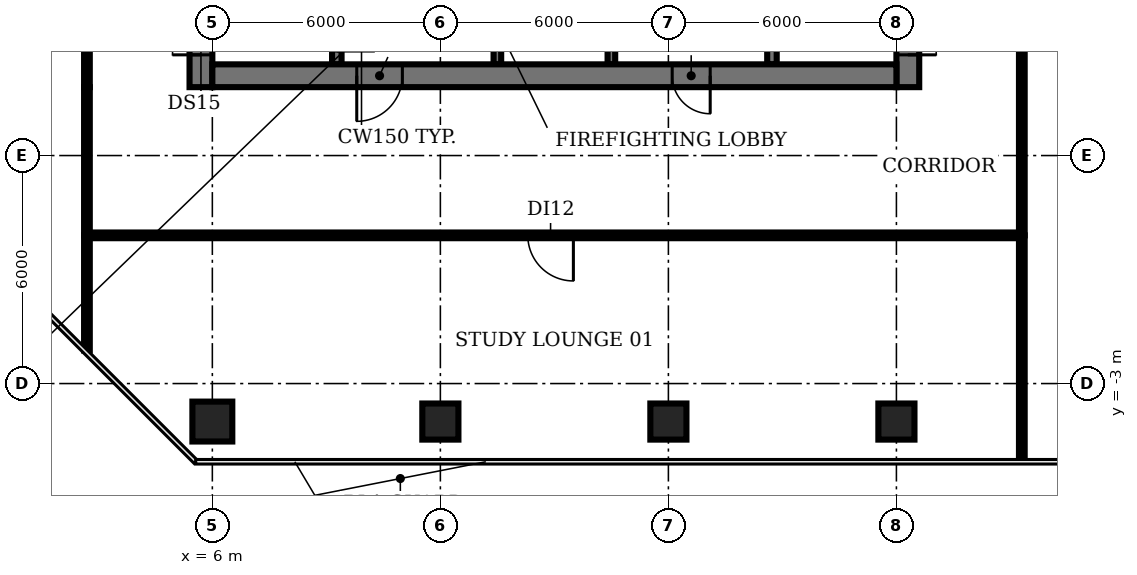
"""IFC4 building model, lengths in metres.
Left out: names, types, materials, properties, quantities, classifications, styles, units other than length and angle.
Written with IfcOpenShell. Run it as: python <this file> out.ifc"""

import sys

from ifc_helpers import new_model, si_unit, direction, frame, frame_2d, origin, origin_2d, place, context, subcontext, project, spatial, rectangle, circle, extrude, element, fill, save


model = new_model("IFC4")
c1 = context("Model", 3, precision=1e-05, world=origin(), true_north=direction((0.0, 1.0)))
c2 = subcontext(c1, "Body", "Model", "MODEL_VIEW")
j1 = project(units=[si_unit("LENGTHUNIT", "METRE"), si_unit("PLANEANGLEUNIT", "RADIAN")], contexts=[c1])
p1 = place(None, origin())
s1 = spatial("IfcSite", under=j1, at=p1, CompositionType="ELEMENT")
p2 = place(p1, origin())
s2 = spatial("IfcBuilding", under=s1, at=p2, CompositionType="ELEMENT")
p3 = place(p2, frame((0.0, 0.0, 192.8)))
s3 = spatial("IfcBuildingStorey", under=s2, at=p3, CompositionType="ELEMENT", Elevation=192.8)
p4 = place(p3, frame((6.0, -4.0, 0.0), z_axis=(0.0, 0.0, 1.0), x_axis=(1.0, 0.0, 0.0)))
e1 = element("IfcColumn", 1, at=p4, inside=s3, PredefinedType="COLUMN", context=c2, shape_type="SweptSolid", body=[
    extrude(circle(Radius=0.525, at=origin_2d()), origin(), (0.0, 0.0, 1.0), 3.2),
])
for number, where, z_axis, x_axis in (
    (2, (12.0, -4.0, 0.0), (0.0, 0.0, 1.0), (1.0, 0.0, 0.0)),
    (3, (18.0, -4.0, 0.0), (0.0, 0.0, 1.0), (1.0, 0.0, 0.0)),
    (4, (24.0, -4.0, 0.0), (0.0, 0.0, 1.0), (1.0, 0.0, 0.0)),
):
    element("IfcColumn", number, at=place(p3, frame(where, z_axis=z_axis, x_axis=x_axis)), inside=s3, PredefinedType="COLUMN", context=c2, shape_type="SweptSolid", body=[
        extrude(rectangle(XDim=0.95, YDim=0.95, at=origin_2d()), origin(), (0.0, 0.0, 1.0), 3.2),
    ])
p5 = place(p3, frame((9.275, 11.825, 0.0), z_axis=(0.0, 0.0, 1.0), x_axis=(0.0, -1.0, 0.0)))
e5 = element("IfcWall", 5, at=p5, inside=s3, PredefinedType="SHEAR", context=c2, shape_type="SweptSolid", body=[
    extrude(rectangle(XDim=6.425, YDim=0.25, at=frame_2d((3.212, 0.0))), origin(), (0.0, 0.0, 1.0), 3.8),
])
p6 = place(p5, frame((5.075, 0.0, 0.0)))
e6 = element("IfcOpeningElement", 6, at=p6, cuts=e5, PredefinedType="OPENING", context=c2, shape_type="SweptSolid", body=[
    extrude(rectangle(XDim=1.0, YDim=2.1, at=frame_2d((0.5, 1.05))), frame((0.0, 0.135, 0.0), z_axis=(0.0, -1.0, 0.0), x_axis=(1.0, 0.0, 0.0)), (0.0, 0.0, 1.0), 0.27),
])
p7 = place(p3, frame((13.5, 5.4, 0.0), z_axis=(0.0, 0.0, 1.0), x_axis=(0.0, 1.0, 0.0)))
e7 = element("IfcWall", 7, at=p7, inside=s3, PredefinedType="SHEAR", context=c2, shape_type="SweptSolid", body=[
    extrude(rectangle(XDim=8.2, YDim=0.2, at=frame_2d((4.1, 0.0))), origin(), (0.0, 0.0, 1.0), 3.8),
])
p8 = place(p7, frame((0.75, 0.0, 0.0)))
e8 = element("IfcOpeningElement", 8, at=p8, cuts=e7, PredefinedType="OPENING", context=c2, shape_type="SweptSolid", body=[
    extrude(rectangle(XDim=1.1, YDim=2.1, at=frame_2d((0.55, 1.05))), frame((0.0, 0.11, 0.0), z_axis=(0.0, -1.0, 0.0), x_axis=(1.0, 0.0, 0.0)), (0.0, 0.0, 1.0), 0.22),
])
p9 = place(p7, frame((3.55, 0.0, 0.0)))
e9 = element("IfcOpeningElement", 9, at=p9, cuts=e7, PredefinedType="OPENING", context=c2, shape_type="SweptSolid", body=[
    extrude(rectangle(XDim=1.1, YDim=2.1, at=frame_2d((0.55, 1.05))), frame((0.0, 0.11, 0.0), z_axis=(0.0, -1.0, 0.0), x_axis=(1.0, 0.0, 0.0)), (0.0, 0.0, 1.0), 0.22),
])
p10 = place(p7, frame((6.35, 0.0, 0.0)))
e10 = element("IfcOpeningElement", 10, at=p10, cuts=e7, PredefinedType="OPENING", context=c2, shape_type="SweptSolid", body=[
    extrude(rectangle(XDim=1.1, YDim=2.1, at=frame_2d((0.55, 1.05))), frame((0.0, 0.11, 0.0), z_axis=(0.0, -1.0, 0.0), x_axis=(1.0, 0.0, 0.0)), (0.0, 0.0, 1.0), 0.22),
])
p11 = place(p3, frame((16.5, 5.4, 0.0), z_axis=(0.0, 0.0, 1.0), x_axis=(0.0, 1.0, 0.0)))
e11 = element("IfcWall", 11, at=p11, inside=s3, PredefinedType="SHEAR", context=c2, shape_type="SweptSolid", body=[
    extrude(rectangle(XDim=8.2, YDim=0.2, at=frame_2d((4.1, 0.0))), origin(), (0.0, 0.0, 1.0), 3.8),
])
p12 = place(p3, frame((20.725, 5.4, 0.0), z_axis=(0.0, 0.0, 1.0), x_axis=(0.0, 1.0, 0.0)))
e12 = element("IfcWall", 12, at=p12, inside=s3, PredefinedType="SHEAR", context=c2, shape_type="SweptSolid", body=[
    extrude(rectangle(XDim=8.2, YDim=0.25, at=frame_2d((4.1, 0.0))), origin(), (0.0, 0.0, 1.0), 3.8),
])
p13 = place(p3, frame((5.7, 4.8, 0.0), z_axis=(0.0, 0.0, 1.0), x_axis=(0.0, 1.0, 0.0)))
e13 = element("IfcWall", 13, at=p13, inside=s3, PredefinedType="SHEAR", context=c2, shape_type="SweptSolid", body=[
    extrude(rectangle(XDim=20.6, YDim=0.6, at=frame_2d((10.3, 0.0))), origin(), (0.0, 0.0, 1.0), 3.8),
])
p14 = place(p13, frame((0.85, 0.0, 0.0)))
e14 = element("IfcOpeningElement", 14, at=p14, cuts=e13, PredefinedType="OPENING", context=c2, shape_type="SweptSolid", body=[
    extrude(rectangle(XDim=1.5, YDim=2.1, at=frame_2d((0.75, 1.05))), frame((0.0, 0.31, 0.0), z_axis=(0.0, -1.0, 0.0), x_axis=(1.0, 0.0, 0.0)), (0.0, 0.0, 1.0), 0.62),
])
p15 = place(p13, frame((7.3, 0.0, 0.0)))
e15 = element("IfcOpeningElement", 15, at=p15, cuts=e13, PredefinedType="OPENING", context=c2, shape_type="SweptSolid", body=[
    extrude(rectangle(XDim=1.2, YDim=2.1, at=frame_2d((0.6, 1.05))), frame((0.0, 0.31, 0.0), z_axis=(0.0, -1.0, 0.0), x_axis=(1.0, 0.0, 0.0)), (0.0, 0.0, 1.0), 0.62),
])
p16 = place(p13, frame((13.85, 0.0, 0.0)))
e16 = element("IfcOpeningElement", 16, at=p16, cuts=e13, PredefinedType="OPENING", context=c2, shape_type="SweptSolid", body=[
    extrude(rectangle(XDim=1.2, YDim=2.1, at=frame_2d((0.6, 1.05))), frame((0.0, 0.31, 0.0), z_axis=(0.0, -1.0, 0.0), x_axis=(1.0, 0.0, 0.0)), (0.0, 0.0, 1.0), 0.62),
])
p17 = place(p3, frame((24.3, 25.505, 0.0), z_axis=(0.0, 0.0, 1.0), x_axis=(0.0, -1.0, 0.0)))
e17 = element("IfcWall", 17, at=p17, inside=s3, PredefinedType="SHEAR", context=c2, shape_type="SweptSolid", body=[
    extrude(rectangle(XDim=20.705, YDim=0.6, at=frame_2d((10.353, 0.0))), origin(), (0.0, 0.0, 1.0), 3.8),
])
p18 = place(p17, frame((18.355, 0.0, 0.0)))
e18 = element("IfcOpeningElement", 18, at=p18, cuts=e17, PredefinedType="OPENING", context=c2, shape_type="SweptSolid", body=[
    extrude(rectangle(XDim=1.5, YDim=2.1, at=frame_2d((0.75, 1.05))), frame((0.0, 0.31, 0.0), z_axis=(0.0, -1.0, 0.0), x_axis=(1.0, 0.0, 0.0)), (0.0, 0.0, 1.0), 0.62),
])
p19 = place(p17, frame((12.255, 0.0, 0.0)))
e19 = element("IfcOpeningElement", 19, at=p19, cuts=e17, PredefinedType="OPENING", context=c2, shape_type="SweptSolid", body=[
    extrude(rectangle(XDim=0.9, YDim=2.1, at=frame_2d((0.45, 1.05))), frame((0.0, 0.31, 0.0), z_axis=(0.0, -1.0, 0.0), x_axis=(1.0, 0.0, 0.0)), (0.0, 0.0, 1.0), 0.62),
])
p20 = place(p17, frame((6.255, 0.0, 0.0)))
e20 = element("IfcOpeningElement", 20, at=p20, cuts=e17, PredefinedType="OPENING", context=c2, shape_type="SweptSolid", body=[
    extrude(rectangle(XDim=2.0, YDim=2.1, at=frame_2d((1.0, 1.05))), frame((0.0, 0.31, 0.0), z_axis=(0.0, -1.0, 0.0), x_axis=(1.0, 0.0, 0.0)), (0.0, 0.0, 1.0), 0.62),
])
p21 = place(p3, frame((24.0, 5.1, 0.0), z_axis=(0.0, 0.0, 1.0), x_axis=(-1.0, 0.0, 0.0)))
e21 = element("IfcWall", 21, at=p21, inside=s3, PredefinedType="SHEAR", context=c2, shape_type="SweptSolid", body=[
    extrude(rectangle(XDim=18.0, YDim=0.6, at=frame_2d((9.0, 0.0))), origin(), (0.0, 0.0, 1.0), 3.8),
])
p22 = place(p21, frame((13.0, 0.0, 0.0)))
e22 = element("IfcOpeningElement", 22, at=p22, cuts=e21, PredefinedType="OPENING", context=c2, shape_type="SweptSolid", body=[
    extrude(rectangle(XDim=1.2, YDim=2.1, at=frame_2d((0.6, 1.05))), frame((0.0, 0.31, 0.0), z_axis=(0.0, -1.0, 0.0), x_axis=(1.0, 0.0, 0.0)), (0.0, 0.0, 1.0), 0.62),
])
p23 = place(p21, frame((4.9, 0.0, 0.0)))
e23 = element("IfcOpeningElement", 23, at=p23, cuts=e21, PredefinedType="OPENING", context=c2, shape_type="SweptSolid", body=[
    extrude(rectangle(XDim=1.0, YDim=2.1, at=frame_2d((0.5, 1.05))), frame((0.0, 0.31, 0.0), z_axis=(0.0, -1.0, 0.0), x_axis=(1.0, 0.0, 0.0)), (0.0, 0.0, 1.0), 0.62),
])
p24 = place(p3, frame((2.7, -2.13, 0.0), z_axis=(0.0, 0.0, 1.0), x_axis=(0.0, 1.0, 0.0)))
e24 = element("IfcWall", 24, at=p24, inside=s3, PredefinedType="PARTITIONING", context=c2, shape_type="SweptSolid", body=[
    extrude(rectangle(XDim=3.03, YDim=0.15, at=frame_2d((1.515, 0.0))), origin(), (0.0, 0.0, 1.0), 2.83),
])
p25 = place(p3, frame((2.7, 0.9, 0.0), z_axis=(0.0, 0.0, 1.0), x_axis=(0.0, 1.0, 0.0)))
e25 = element("IfcWall", 25, at=p25, inside=s3, PredefinedType="PARTITIONING", context=c2, shape_type="SweptSolid", body=[
    extrude(rectangle(XDim=3.9, YDim=0.15, at=frame_2d((1.95, 0.0))), origin(), (0.0, 0.0, 1.0), 2.83),
])
p26 = place(p3, frame((2.7, 4.8, 0.0), z_axis=(0.0, 0.0, 1.0), x_axis=(0.0, 1.0, 0.0)))
e26 = element("IfcWall", 26, at=p26, inside=s3, PredefinedType="PARTITIONING", context=c2, shape_type="SweptSolid", body=[
    extrude(rectangle(XDim=20.6, YDim=0.15, at=frame_2d((10.3, 0.0))), origin(), (0.0, 0.0, 1.0), 2.83),
])
p27 = place(p26, frame((10.2, 0.0, 0.0)))
e27 = element("IfcOpeningElement", 27, at=p27, cuts=e26, PredefinedType="OPENING", context=c2, shape_type="SweptSolid", body=[
    extrude(rectangle(XDim=1.2, YDim=2.1, at=frame_2d((0.6, 1.05))), frame((0.0, 0.085, 0.0), z_axis=(0.0, -1.0, 0.0), x_axis=(1.0, 0.0, 0.0)), (0.0, 0.0, 1.0), 0.17),
])
p28 = place(p3, frame((27.3, -5.01, 0.0), z_axis=(0.0, 0.0, 1.0), x_axis=(0.0, 1.0, 0.0)))
e28 = element("IfcWall", 28, at=p28, inside=s3, PredefinedType="PARTITIONING", context=c2, shape_type="SweptSolid", body=[
    extrude(rectangle(XDim=5.91, YDim=0.15, at=frame_2d((2.955, 0.0))), origin(), (0.0, 0.0, 1.0), 2.83),
])
p29 = place(p3, frame((27.3, 0.9, 0.0), z_axis=(0.0, 0.0, 1.0), x_axis=(-1.0, 0.0, 0.0)))
e29 = element("IfcWall", 29, at=p29, inside=s3, PredefinedType="PARTITIONING", context=c2, shape_type="SweptSolid", body=[
    extrude(rectangle(XDim=24.6, YDim=0.15, at=frame_2d((12.3, 0.0))), origin(), (0.0, 0.0, 1.0), 2.83),
])
p30 = place(p29, frame((11.8, 0.0, 0.0)))
e30 = element("IfcOpeningElement", 30, at=p30, cuts=e29, PredefinedType="OPENING", context=c2, shape_type="SweptSolid", body=[
    extrude(rectangle(XDim=1.2, YDim=2.1, at=frame_2d((0.6, 1.05))), frame((0.0, 0.085, 0.0), z_axis=(0.0, -1.0, 0.0), x_axis=(1.0, 0.0, 0.0)), (0.0, 0.0, 1.0), 0.17),
])
p31 = place(p3, frame((27.3, 0.9, 0.0), z_axis=(0.0, 0.0, 1.0), x_axis=(0.0, 1.0, 0.0)))
e31 = element("IfcWall", 31, at=p31, inside=s3, PredefinedType="PARTITIONING", context=c2, shape_type="SweptSolid", body=[
    extrude(rectangle(XDim=13.9, YDim=0.15, at=frame_2d((6.95, 0.0))), origin(), (0.0, 0.0, 1.0), 2.83),
])
p32 = place(p14, origin())
e32 = element("IfcDoor", 32, at=p32, inside=s3, OperationType="DOUBLE_DOOR_SINGLE_SWING", PredefinedType="DOOR", context=c2, shape_type="SweptSolid", body=[
    extrude(rectangle(XDim=1.5, YDim=2.1, at=frame_2d((0.75, 1.05))), frame((0.0, 0.025, 0.0), z_axis=(0.0, -1.0, 0.0), x_axis=(1.0, 0.0, 0.0)), (0.0, 0.0, 1.0), 0.05),
])
fill(e14, e32)
p33 = place(p18, origin())
e33 = element("IfcDoor", 33, at=p33, inside=s3, OperationType="DOUBLE_DOOR_SINGLE_SWING", PredefinedType="DOOR", context=c2, shape_type="SweptSolid", body=[
    extrude(rectangle(XDim=1.5, YDim=2.1, at=frame_2d((0.75, 1.05))), frame((0.0, 0.025, 0.0), z_axis=(0.0, -1.0, 0.0), x_axis=(1.0, 0.0, 0.0)), (0.0, 0.0, 1.0), 0.05),
])
fill(e18, e33)
p34 = place(p22, origin())
e34 = element("IfcDoor", 34, at=p34, inside=s3, OperationType="SINGLE_SWING_RIGHT", PredefinedType="DOOR", context=c2, shape_type="SweptSolid", body=[
    extrude(rectangle(XDim=1.2, YDim=2.1, at=frame_2d((0.6, 1.05))), frame((0.0, 0.025, 0.0), z_axis=(0.0, -1.0, 0.0), x_axis=(1.0, 0.0, 0.0)), (0.0, 0.0, 1.0), 0.05),
])
fill(e22, e34)
p35 = place(p23, origin())
e35 = element("IfcDoor", 35, at=p35, inside=s3, OperationType="SINGLE_SWING_LEFT", PredefinedType="DOOR", context=c2, shape_type="SweptSolid", body=[
    extrude(rectangle(XDim=1.0, YDim=2.1, at=frame_2d((0.5, 1.05))), frame((0.0, -0.24, 0.0), z_axis=(0.0, -1.0, 0.0), x_axis=(1.0, 0.0, 0.0)), (0.0, 0.0, 1.0), 0.05),
])
fill(e23, e35)
p36 = place(p30, origin())
e36 = element("IfcDoor", 36, at=p36, inside=s3, OperationType="SINGLE_SWING_LEFT", PredefinedType="DOOR", context=c2, shape_type="SweptSolid", body=[
    extrude(rectangle(XDim=1.2, YDim=2.1, at=frame_2d((0.6, 1.05))), frame((0.0, 0.025, 0.0), z_axis=(0.0, -1.0, 0.0), x_axis=(1.0, 0.0, 0.0)), (0.0, 0.0, 1.0), 0.05),
])
fill(e30, e36)
save(model, sys.argv[1])
